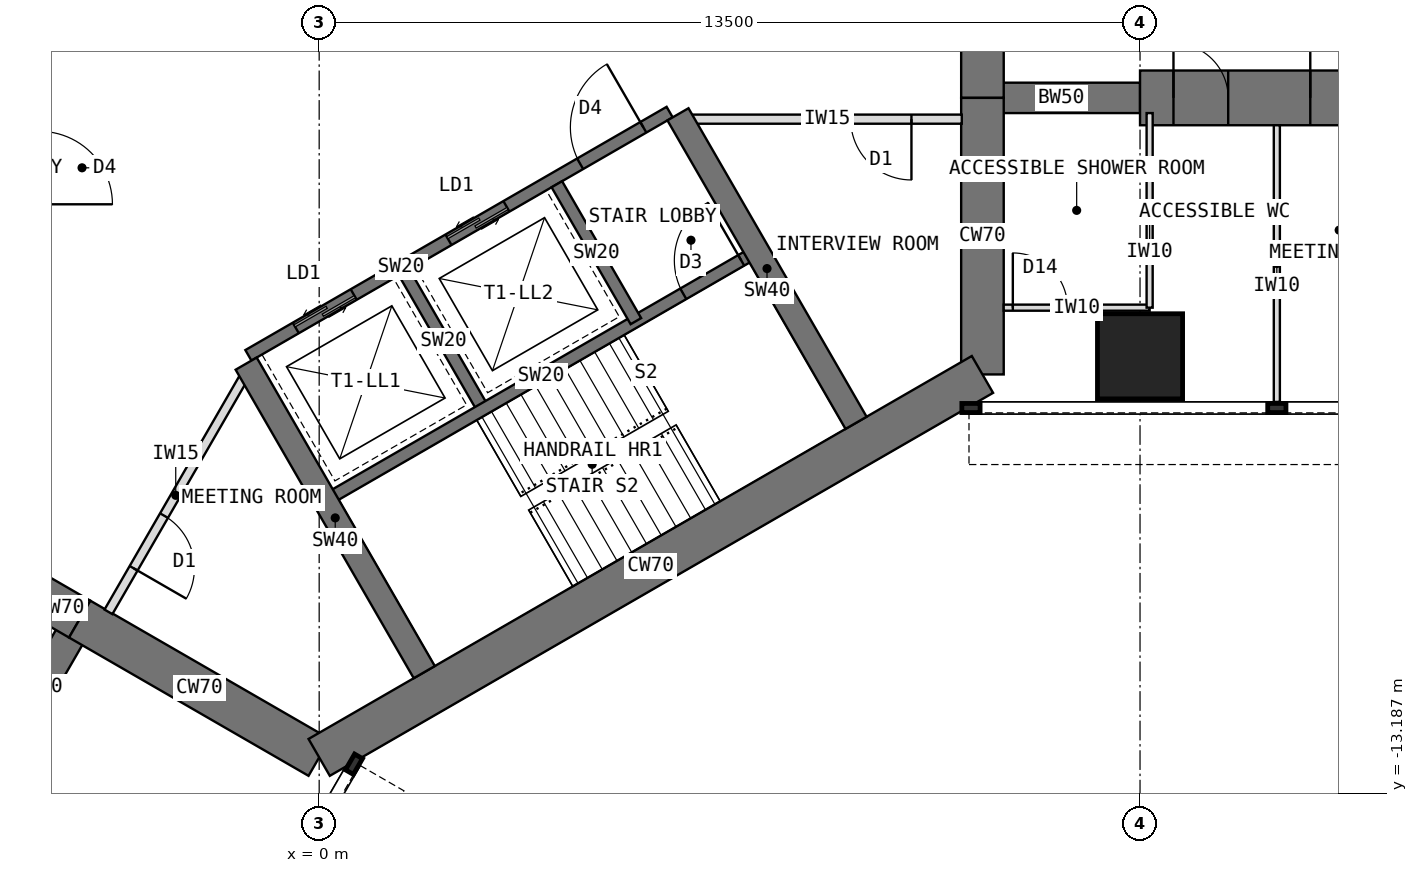
"""IFC4 building model, lengths in metres.
Left out: names, types, materials, properties, quantities, classifications, styles, units other than length and angle.
Written with IfcOpenShell. Run it as: python <this file> out.ifc"""

import sys

from ifc_helpers import new_model, si_unit, direction, frame, frame_2d, origin, origin_2d, place, context, subcontext, project, spatial, rectangle, extrude, element, fill, save


model = new_model("IFC4")
c1 = context("Model", 3, precision=1e-05, world=origin(), true_north=direction((0.0, 1.0)))
c2 = subcontext(c1, "Body", "Model", "MODEL_VIEW")
j1 = project(units=[si_unit("LENGTHUNIT", "METRE"), si_unit("PLANEANGLEUNIT", "RADIAN")], contexts=[c1])
p1 = place(None, origin())
s1 = spatial("IfcSite", under=j1, at=p1, CompositionType="ELEMENT")
p2 = place(p1, origin())
s2 = spatial("IfcBuilding", under=s1, at=p2, CompositionType="ELEMENT")
p3 = place(p2, frame((0.0, 0.0, 88.5)))
s3 = spatial("IfcBuildingStorey", under=s2, at=p3, CompositionType="ELEMENT", Elevation=88.5)
p4 = place(p3, frame((10.908, -6.298, 0.0), z_axis=(0.0, 0.0, 1.0), x_axis=(0.0, 1.0, 0.0)))
e1 = element("IfcWall", 1, at=p4, inside=s3, PredefinedType="SHEAR", context=c2, shape_type="SweptSolid", body=[
    extrude(rectangle(XDim=4.548, YDim=0.7, at=frame_2d((2.274, 0.0))), origin(), (0.0, 0.0, 1.0), 4.0),
])
p5 = place(p3, frame((10.908, -1.75, 0.0), z_axis=(0.0, 0.0, 1.0), x_axis=(0.0, 1.0, 0.0)))
e2 = element("IfcWall", 2, at=p5, inside=s3, PredefinedType="SHEAR", context=c2, shape_type="SweptSolid", body=[
    extrude(rectangle(XDim=3.5, YDim=0.7, at=frame_2d((1.75, 0.0))), origin(), (0.0, 0.0, 1.0), 4.0),
])
p6 = place(p5, frame((0.85, 0.0, 0.0)))
e3 = element("IfcOpeningElement", 3, at=p6, cuts=e2, PredefinedType="OPENING", context=c2, shape_type="SweptSolid", body=[
    extrude(rectangle(XDim=1.8, YDim=2.1, at=frame_2d((0.9, 1.05))), frame((0.0, 0.36, 0.0), z_axis=(0.0, -1.0, 0.0), x_axis=(1.0, 0.0, 0.0)), (0.0, 0.0, 1.0), 0.72),
])
p7 = place(p3, frame((-6.97, -8.572, 0.0), z_axis=(0.0, 0.0, 1.0), x_axis=(0.866019471182, -0.500010275428, 0.0)))
e4 = element("IfcWall", 4, at=p7, inside=s3, PredefinedType="SHEAR", context=c2, shape_type="SweptSolid", body=[
    extrude(rectangle(XDim=3.5, YDim=0.7, at=frame_2d((1.75, 0.0))), origin(), (0.0, 0.0, 1.0), 4.0),
])
p8 = place(p7, frame((0.85, 0.0, 0.0)))
e5 = element("IfcOpeningElement", 5, at=p8, cuts=e4, PredefinedType="OPENING", context=c2, shape_type="SweptSolid", body=[
    extrude(rectangle(XDim=1.8, YDim=2.1, at=frame_2d((0.9, 1.05))), frame((0.0, 0.36, 0.0), z_axis=(0.0, -1.0, 0.0), x_axis=(1.0, 0.0, 0.0)), (0.0, 0.0, 1.0), 0.72),
])
p9 = place(p3, frame((-3.939, -10.322, 0.0), z_axis=(0.0, 0.0, 1.0), x_axis=(0.866011268655, -0.500024481964, 0.0)))
e6 = element("IfcWall", 6, at=p9, inside=s3, PredefinedType="SHEAR", context=c2, shape_type="SweptSolid", body=[
    extrude(rectangle(XDim=4.548, YDim=0.7, at=frame_2d((2.274, 0.0))), origin(), (0.0, 0.0, 1.0), 4.0),
])
p10 = place(p3, frame((0.0, -12.596, 0.0), z_axis=(0.0, 0.0, 1.0), x_axis=(0.866021940709, 0.500005998175, 0.0)))
e7 = element("IfcWall", 7, at=p10, inside=s3, PredefinedType="SHEAR", context=c2, shape_type="SweptSolid", body=[
    extrude(rectangle(XDim=12.596, YDim=0.7, at=frame_2d((6.298, 0.0))), origin(), (0.0, 0.0, 1.0), 4.0),
])
p11 = place(p3, frame((10.908, -1.75, 0.0), z_axis=(0.0, 0.0, 1.0), x_axis=(1.0, 0.0, 0.0)))
e8 = element("IfcWall", 8, at=p11, inside=s3, PredefinedType="SHEAR", context=c2, shape_type="SweptSolid", body=[
    extrude(rectangle(XDim=2.592, YDim=0.5, at=frame_2d((1.296, 0.0))), origin(), (0.0, 0.0, 1.0), 4.0),
])
p12 = place(p3, frame((13.5, -1.75, 0.0), z_axis=(0.0, 0.0, 1.0), x_axis=(1.0, 0.0, 0.0)))
e9 = element("IfcWall", 9, at=p12, inside=s3, PredefinedType="SHEAR", context=c2, shape_type="SweptSolid", body=[
    extrude(rectangle(XDim=13.2, YDim=0.9, at=frame_2d((6.6, 0.0))), origin(), (0.0, 0.0, 1.0), 4.0),
])
p13 = place(p12, frame((0.55, 0.0, 0.0)))
e10 = element("IfcOpeningElement", 10, at=p13, cuts=e9, PredefinedType="OPENING", context=c2, shape_type="SweptSolid", body=[
    extrude(rectangle(XDim=0.9, YDim=2.1, at=frame_2d((0.45, 1.05))), frame((0.0, 0.46, 0.0), z_axis=(0.0, -1.0, 0.0), x_axis=(1.0, 0.0, 0.0)), (0.0, 0.0, 1.0), 0.92),
])
p14 = place(p12, frame((2.8, 0.0, 0.0)))
e11 = element("IfcOpeningElement", 11, at=p14, cuts=e9, PredefinedType="OPENING", context=c2, shape_type="SweptSolid", body=[
    extrude(rectangle(XDim=0.9, YDim=2.1, at=frame_2d((0.45, 1.05))), frame((0.0, 0.46, 0.0), z_axis=(0.0, -1.0, 0.0), x_axis=(1.0, 0.0, 0.0)), (0.0, 0.0, 1.0), 0.92),
])
p15 = place(p12, frame((7.3, 0.0, 0.0)))
e12 = element("IfcOpeningElement", 12, at=p15, cuts=e9, PredefinedType="OPENING", context=c2, shape_type="SweptSolid", body=[
    extrude(rectangle(XDim=0.9, YDim=2.1, at=frame_2d((0.45, 1.05))), frame((0.0, 0.46, 0.0), z_axis=(0.0, -1.0, 0.0), x_axis=(1.0, 0.0, 0.0)), (0.0, 0.0, 1.0), 0.92),
])
p16 = place(p3, frame((-3.939, -10.322, 0.0), z_axis=(0.0, 0.0, 1.0), x_axis=(-0.499918158782, -0.866072649678, 0.0)))
e13 = element("IfcWall", 13, at=p16, inside=s3, PredefinedType="SHEAR", context=c2, shape_type="SweptSolid", body=[
    extrude(rectangle(XDim=2.592, YDim=0.5, at=frame_2d((1.296, 0.0))), origin(), (0.0, 0.0, 1.0), 4.0),
])
p17 = place(p3, frame((13.5, -6.0, 0.0), z_axis=(0.0, 0.0, 1.0), x_axis=(1.0, 0.0, 0.0)))
e14 = element("IfcColumn", 14, at=p17, inside=s3, PredefinedType="COLUMN", context=c2, shape_type="SweptSolid", body=[
    extrude(rectangle(XDim=1.4, YDim=1.4, at=origin_2d()), origin(), (0.0, 0.0, 1.0), 4.0),
])
p18 = place(p3, frame((-1.164, -5.984, 0.0), z_axis=(0.0, 0.0, 1.0), x_axis=(0.866026010844, 0.49999894854, 0.0)))
e15 = element("IfcWall", 15, at=p18, inside=s3, PredefinedType="SHEAR", context=c2, shape_type="SweptSolid", body=[
    extrude(rectangle(XDim=8.0, YDim=0.2, at=frame_2d((4.0, 0.0))), origin(), (0.0, 0.0, 1.0), 4.0),
])
p19 = place(p18, frame((6.3, 0.0, 0.0)))
e16 = element("IfcOpeningElement", 16, at=p19, cuts=e15, PredefinedType="OPENING", context=c2, shape_type="SweptSolid", body=[
    extrude(rectangle(XDim=1.2, YDim=2.1, at=frame_2d((0.6, 1.05))), frame((0.0, 0.11, 0.0), z_axis=(0.0, -1.0, 0.0), x_axis=(1.0, 0.0, 0.0)), (0.0, 0.0, 1.0), 0.22),
])
p20 = place(p18, frame((0.9, 0.0, 0.0)))
e17 = element("IfcOpeningElement", 17, at=p20, cuts=e15, PredefinedType="OPENING", context=c2, shape_type="SweptSolid", body=[
    extrude(rectangle(XDim=1.1, YDim=2.2, at=frame_2d((0.55, 1.1))), frame((0.0, 0.11, 0.0), z_axis=(0.0, -1.0, 0.0), x_axis=(1.0, 0.0, 0.0)), (0.0, 0.0, 1.0), 0.22),
])
p21 = place(p18, frame((3.8, 0.0, 0.0)))
e18 = element("IfcOpeningElement", 18, at=p21, cuts=e15, PredefinedType="OPENING", context=c2, shape_type="SweptSolid", body=[
    extrude(rectangle(XDim=1.1, YDim=2.2, at=frame_2d((0.55, 1.1))), frame((0.0, 0.11, 0.0), z_axis=(0.0, -1.0, 0.0), x_axis=(1.0, 0.0, 0.0)), (0.0, 0.0, 1.0), 0.22),
])
p22 = place(p3, frame((1.397, -4.62, 0.0), z_axis=(0.0, 0.0, 1.0), x_axis=(0.499936506574, -0.866062058628, 0.0)))
e19 = element("IfcWall", 19, at=p22, inside=s3, PredefinedType="SHEAR", context=c2, shape_type="SweptSolid", body=[
    extrude(rectangle(XDim=2.6, YDim=0.2, at=frame_2d((1.3, 0.0))), origin(), (0.0, 0.0, 1.0), 4.0),
])
p23 = place(p3, frame((3.909, -3.17, 0.0), z_axis=(0.0, 0.0, 1.0), x_axis=(0.49997716683, -0.86603858612, 0.0)))
e20 = element("IfcWall", 20, at=p23, inside=s3, PredefinedType="SHEAR", context=c2, shape_type="SweptSolid", body=[
    extrude(rectangle(XDim=2.6, YDim=0.2, at=frame_2d((1.3, 0.0))), origin(), (0.0, 0.0, 1.0), 4.0),
])
p24 = place(p3, frame((0.186, -8.322, 0.0), z_axis=(0.0, 0.0, 1.0), x_axis=(0.866026010844, 0.49999894854, 0.0)))
e21 = element("IfcWall", 21, at=p24, inside=s3, PredefinedType="SHEAR", context=c2, shape_type="SweptSolid", body=[
    extrude(rectangle(XDim=8.0, YDim=0.2, at=frame_2d((4.0, 0.0))), origin(), (0.0, 0.0, 1.0), 4.0),
])
p25 = place(p24, frame((6.7, 0.0, 0.0)))
e22 = element("IfcOpeningElement", 22, at=p25, cuts=e21, PredefinedType="OPENING", context=c2, shape_type="SweptSolid", body=[
    extrude(rectangle(XDim=1.1, YDim=2.1, at=frame_2d((0.55, 1.05))), frame((0.0, 0.11, 0.0), z_axis=(0.0, -1.0, 0.0), x_axis=(1.0, 0.0, 0.0)), (0.0, 0.0, 1.0), 0.22),
])
for number, where, z_axis, x_axis in (
    (23, (5.901, -2.02, 0.0), (0.0, 0.0, 1.0), (0.5, -0.866, 0.0)),
    (24, (-1.201, -6.12, 0.0), (0.0, 0.0, 1.0), (0.5, -0.866, 0.0)),
):
    element("IfcWall", number, at=place(p3, frame(where, z_axis=z_axis, x_axis=x_axis)), inside=s3, PredefinedType="SHEAR", context=c2, shape_type="SweptSolid", body=[
        extrude(rectangle(XDim=5.858, YDim=0.4, at=frame_2d((2.929, 0.0))), origin(), (0.0, 0.0, 1.0), 4.0),
    ])
p26 = place(p3, frame((15.75, -2.2, 0.0), z_axis=(0.0, 0.0, 1.0), x_axis=(0.0, -1.0, 0.0)))
e25 = element("IfcWall", 25, at=p26, inside=s3, PredefinedType="PARTITIONING", context=c2, shape_type="SweptSolid", body=[
    extrude(rectangle(XDim=4.55, YDim=0.1, at=frame_2d((2.275, 0.0))), origin(), (0.0, 0.0, 1.0), 3.7),
])
p27 = place(p3, frame((11.258, -5.2, 0.0), z_axis=(0.0, 0.0, 1.0), x_axis=(1.0, 0.0, 0.0)))
e26 = element("IfcWall", 26, at=p27, inside=s3, PredefinedType="PARTITIONING", context=c2, shape_type="SweptSolid", body=[
    extrude(rectangle(XDim=2.4, YDim=0.1, at=frame_2d((1.2, 0.0))), origin(), (0.0, 0.0, 1.0), 3.7),
])
p28 = place(p27, frame((0.15, 0.0, 0.0)))
e27 = element("IfcOpeningElement", 27, at=p28, cuts=e26, PredefinedType="OPENING", context=c2, shape_type="SweptSolid", body=[
    extrude(rectangle(XDim=0.9, YDim=2.1, at=frame_2d((0.45, 1.05))), frame((0.0, 0.06, 0.0), z_axis=(0.0, -1.0, 0.0), x_axis=(1.0, 0.0, 0.0)), (0.0, 0.0, 1.0), 0.12),
])
p29 = place(p3, frame((13.658, -2.0, 0.0), z_axis=(0.0, 0.0, 1.0), x_axis=(0.0, -1.0, 0.0)))
e28 = element("IfcWall", 28, at=p29, inside=s3, PredefinedType="PARTITIONING", context=c2, shape_type="SweptSolid", body=[
    extrude(rectangle(XDim=3.2, YDim=0.1, at=frame_2d((1.6, 0.0))), origin(), (0.0, 0.0, 1.0), 3.7),
])
p30 = place(p3, frame((-1.253, -6.37, 0.0), z_axis=(0.0, 0.0, 1.0), x_axis=(-0.500007369519, -0.866021148949, 0.0)))
e29 = element("IfcWall", 29, at=p30, inside=s3, PredefinedType="PARTITIONING", context=c2, shape_type="SweptSolid", body=[
    extrude(rectangle(XDim=4.426, YDim=0.15, at=frame_2d((2.213, 0.0))), origin(), (0.0, 0.0, 1.0), 3.7),
])
p31 = place(p30, frame((2.598, 0.0, 0.0)))
e30 = element("IfcOpeningElement", 30, at=p31, cuts=e29, PredefinedType="OPENING", context=c2, shape_type="SweptSolid", body=[
    extrude(rectangle(XDim=1.0, YDim=2.1, at=frame_2d((0.5, 1.05))), frame((0.0, 0.085, 0.0), z_axis=(0.0, -1.0, 0.0), x_axis=(1.0, 0.0, 0.0)), (0.0, 0.0, 1.0), 0.17),
])
p32 = place(p3, frame((10.568, -2.1, 0.0), z_axis=(0.0, 0.0, 1.0), x_axis=(-1.0, 0.0, 0.0)))
e31 = element("IfcWall", 31, at=p32, inside=s3, PredefinedType="PARTITIONING", context=c2, shape_type="SweptSolid", body=[
    extrude(rectangle(XDim=4.426, YDim=0.15, at=frame_2d((2.213, 0.0))), origin(), (0.0, 0.0, 1.0), 3.7),
])
p33 = place(p32, frame((0.828, 0.0, 0.0)))
e32 = element("IfcOpeningElement", 32, at=p33, cuts=e31, PredefinedType="OPENING", context=c2, shape_type="SweptSolid", body=[
    extrude(rectangle(XDim=1.0, YDim=2.1, at=frame_2d((0.5, 1.05))), frame((0.0, 0.085, 0.0), z_axis=(0.0, -1.0, 0.0), x_axis=(1.0, 0.0, 0.0)), (0.0, 0.0, 1.0), 0.17),
])
p34 = place(p19, origin())
e33 = element("IfcDoor", 33, at=p34, inside=s3, OperationType="SINGLE_SWING_RIGHT", PredefinedType="DOOR", context=c2, shape_type="SweptSolid", body=[
    extrude(rectangle(XDim=1.2, YDim=2.1, at=frame_2d((0.6, 1.05))), frame((0.0, 0.025, 0.0), z_axis=(0.0, -1.0, 0.0), x_axis=(1.0, 0.0, 0.0)), (0.0, 0.0, 1.0), 0.05),
])
fill(e16, e33)
p35 = place(p20, origin())
e34 = element("IfcDoor", 34, at=p35, inside=s3, OperationType="DOUBLE_DOOR_SLIDING", PredefinedType="DOOR", context=c2, shape_type="SweptSolid", body=[
    extrude(rectangle(XDim=1.1, YDim=2.2, at=frame_2d((0.55, 1.1))), frame((0.0, 0.025, 0.0), z_axis=(0.0, -1.0, 0.0), x_axis=(1.0, 0.0, 0.0)), (0.0, 0.0, 1.0), 0.05),
])
fill(e17, e34)
p36 = place(p21, origin())
e35 = element("IfcDoor", 35, at=p36, inside=s3, OperationType="DOUBLE_DOOR_SLIDING", PredefinedType="DOOR", context=c2, shape_type="SweptSolid", body=[
    extrude(rectangle(XDim=1.1, YDim=2.2, at=frame_2d((0.55, 1.1))), frame((0.0, 0.025, 0.0), z_axis=(0.0, -1.0, 0.0), x_axis=(1.0, 0.0, 0.0)), (0.0, 0.0, 1.0), 0.05),
])
fill(e18, e35)
p37 = place(p25, origin())
e36 = element("IfcDoor", 36, at=p37, inside=s3, OperationType="SINGLE_SWING_RIGHT", PredefinedType="DOOR", context=c2, shape_type="SweptSolid", body=[
    extrude(rectangle(XDim=1.1, YDim=2.1, at=frame_2d((0.55, 1.05))), frame((0.0, 0.025, 0.0), z_axis=(0.0, -1.0, 0.0), x_axis=(1.0, 0.0, 0.0)), (0.0, 0.0, 1.0), 0.05),
])
fill(e22, e36)
p38 = place(p28, origin())
e37 = element("IfcDoor", 37, at=p38, inside=s3, OperationType="SINGLE_SWING_LEFT", PredefinedType="DOOR", context=c2, shape_type="SweptSolid", body=[
    extrude(rectangle(XDim=0.9, YDim=2.1, at=frame_2d((0.45, 1.05))), frame((0.0, 0.025, 0.0), z_axis=(0.0, -1.0, 0.0), x_axis=(1.0, 0.0, 0.0)), (0.0, 0.0, 1.0), 0.05),
])
fill(e27, e37)
p39 = place(p31, origin())
e38 = element("IfcDoor", 38, at=p39, inside=s3, OperationType="SINGLE_SWING_RIGHT", PredefinedType="DOOR", context=c2, shape_type="SweptSolid", body=[
    extrude(rectangle(XDim=1.0, YDim=2.1, at=frame_2d((0.5, 1.05))), frame((0.0, 0.025, 0.0), z_axis=(0.0, -1.0, 0.0), x_axis=(1.0, 0.0, 0.0)), (0.0, 0.0, 1.0), 0.05),
])
fill(e30, e38)
p40 = place(p33, origin())
e39 = element("IfcDoor", 39, at=p40, inside=s3, OperationType="SINGLE_SWING_LEFT", PredefinedType="DOOR", context=c2, shape_type="SweptSolid", body=[
    extrude(rectangle(XDim=1.0, YDim=2.1, at=frame_2d((0.5, 1.05))), frame((0.0, 0.025, 0.0), z_axis=(0.0, -1.0, 0.0), x_axis=(1.0, 0.0, 0.0)), (0.0, 0.0, 1.0), 0.05),
])
fill(e32, e39)
p41 = place(p13, origin())
e40 = element("IfcDoor", 40, at=p41, inside=s3, OperationType="SINGLE_SWING_LEFT", PredefinedType="DOOR", context=c2, shape_type="SweptSolid", body=[
    extrude(rectangle(XDim=0.82, YDim=2.06, at=frame_2d((0.45, 1.03))), frame((0.0, 0.025, 0.0), z_axis=(0.0, -1.0, 0.0), x_axis=(1.0, 0.0, 0.0)), (0.0, 0.0, 1.0), 0.05),
    extrude(rectangle(XDim=0.04, YDim=2.1, at=frame_2d((0.02, 1.05))), frame((0.0, 0.45, 0.0), z_axis=(0.0, -1.0, 0.0), x_axis=(1.0, 0.0, 0.0)), (0.0, 0.0, 1.0), 0.899),
    extrude(rectangle(XDim=0.04, YDim=2.1, at=frame_2d((0.88, 1.05))), frame((0.0, 0.45, 0.0), z_axis=(0.0, -1.0, 0.0), x_axis=(1.0, 0.0, 0.0)), (0.0, 0.0, 1.0), 0.899),
    extrude(rectangle(XDim=0.82, YDim=0.04, at=frame_2d((0.45, 2.08))), frame((0.0, 0.45, 0.0), z_axis=(0.0, -1.0, 0.0), x_axis=(1.0, 0.0, 0.0)), (0.0, 0.0, 1.0), 0.899),
])
fill(e10, e40)
p42 = place(p14, origin())
e41 = element("IfcDoor", 41, at=p42, inside=s3, OperationType="SINGLE_SWING_LEFT", PredefinedType="DOOR", context=c2, shape_type="SweptSolid", body=[
    extrude(rectangle(XDim=0.82, YDim=2.06, at=frame_2d((0.45, 1.03))), frame((0.0, 0.025, 0.0), z_axis=(0.0, -1.0, 0.0), x_axis=(1.0, 0.0, 0.0)), (0.0, 0.0, 1.0), 0.05),
    extrude(rectangle(XDim=0.04, YDim=2.1, at=frame_2d((0.02, 1.05))), frame((0.0, 0.45, 0.0), z_axis=(0.0, -1.0, 0.0), x_axis=(1.0, 0.0, 0.0)), (0.0, 0.0, 1.0), 0.899),
    extrude(rectangle(XDim=0.04, YDim=2.1, at=frame_2d((0.88, 1.05))), frame((0.0, 0.45, 0.0), z_axis=(0.0, -1.0, 0.0), x_axis=(1.0, 0.0, 0.0)), (0.0, 0.0, 1.0), 0.899),
    extrude(rectangle(XDim=0.82, YDim=0.04, at=frame_2d((0.45, 2.08))), frame((0.0, 0.45, 0.0), z_axis=(0.0, -1.0, 0.0), x_axis=(1.0, 0.0, 0.0)), (0.0, 0.0, 1.0), 0.899),
])
fill(e11, e41)
save(model, sys.argv[1])
